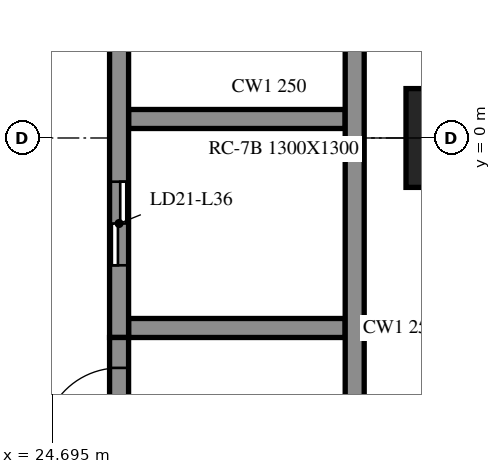
"""IFC4 building model, lengths in metres.
Left out: names, types, materials, properties, quantities, classifications, styles, units other than length and angle.
Written with IfcOpenShell. Run it as: python <this file> out.ifc"""

import sys

from ifc_helpers import new_model, si_unit, direction, frame, frame_2d, origin, origin_2d, place, context, subcontext, project, spatial, rectangle, extrude, element, fill, save


model = new_model("IFC4")
c1 = context("Model", 3, precision=1e-05, world=origin(), true_north=direction((0.0, 1.0)))
c2 = subcontext(c1, "Body", "Model", "MODEL_VIEW")
j1 = project(units=[si_unit("LENGTHUNIT", "METRE"), si_unit("PLANEANGLEUNIT", "RADIAN")], contexts=[c1])
p1 = place(None, origin())
s1 = spatial("IfcSite", under=j1, at=p1, CompositionType="ELEMENT")
p2 = place(p1, origin())
s2 = spatial("IfcBuilding", under=s1, at=p2, CompositionType="ELEMENT")
p3 = place(p2, frame((0.0, 0.0, 154.8)))
s3 = spatial("IfcBuildingStorey", under=s2, at=p3, CompositionType="ELEMENT", Elevation=154.8)
p4 = place(p3, frame((30.0, 0.0, -0.55), z_axis=(0.0, 0.0, 1.0), x_axis=(1.0, 0.0, 0.0)))
e1 = element("IfcColumn", 1, at=p4, inside=s3, PredefinedType="COLUMN", context=c2, shape_type="SweptSolid", body=[
    extrude(rectangle(XDim=1.3, YDim=1.3, at=origin_2d()), origin(), (0.0, 0.0, 1.0), 4.61),
])
p5 = place(p3, frame((28.675, -9.125, 0.0), z_axis=(0.0, 0.0, 1.0), x_axis=(0.0, 1.0, 0.0)))
e2 = element("IfcWall", 2, at=p5, inside=s3, PredefinedType="SOLIDWALL", context=c2, shape_type="SweptSolid", body=[
    extrude(rectangle(XDim=24.25, YDim=0.25, at=frame_2d((12.125, 0.0))), origin(), (0.0, 0.0, 1.0), 4.06),
])
p6 = place(p5, frame((19.062, 0.0, 0.0)))
e3 = element("IfcOpeningElement", 3, at=p6, cuts=e2, PredefinedType="OPENING", context=c2, shape_type="SweptSolid", body=[
    extrude(rectangle(XDim=0.9, YDim=2.1, at=frame_2d((0.45, 1.05))), frame((0.0, 0.135, 0.0), z_axis=(0.0, -1.0, 0.0), x_axis=(1.0, 0.0, 0.0)), (0.0, 0.0, 1.0), 0.27),
])
p7 = place(p5, frame((21.289, 0.0, 0.0)))
e4 = element("IfcOpeningElement", 4, at=p7, cuts=e2, PredefinedType="OPENING", context=c2, shape_type="SweptSolid", body=[
    extrude(rectangle(XDim=0.9, YDim=2.1, at=frame_2d((0.45, 1.05))), frame((0.0, 0.135, 0.0), z_axis=(0.0, -1.0, 0.0), x_axis=(1.0, 0.0, 0.0)), (0.0, 0.0, 1.0), 0.27),
])
p8 = place(p3, frame((25.575, -8.875, 0.0), z_axis=(0.0, 0.0, 1.0), x_axis=(0.0, 1.0, 0.0)))
e5 = element("IfcWall", 5, at=p8, inside=s3, PredefinedType="SOLIDWALL", context=c2, shape_type="SweptSolid", body=[
    extrude(rectangle(XDim=6.25, YDim=0.25, at=frame_2d((3.125, 0.0))), origin(), (0.0, 0.0, 1.0), 4.06),
])
p9 = place(p8, frame((4.85, 0.0, 0.0)))
e6 = element("IfcOpeningElement", 6, at=p9, cuts=e5, PredefinedType="OPENING", context=c2, shape_type="SweptSolid", body=[
    extrude(rectangle(XDim=1.0, YDim=2.1, at=frame_2d((0.5, 1.05))), frame((0.0, 0.135, 0.0), z_axis=(0.0, -1.0, 0.0), x_axis=(1.0, 0.0, 0.0)), (0.0, 0.0, 1.0), 0.27),
])
p10 = place(p3, frame((25.575, 14.875, 0.0), z_axis=(0.0, 0.0, 1.0), x_axis=(0.0, -1.0, 0.0)))
e7 = element("IfcWall", 7, at=p10, inside=s3, PredefinedType="SOLIDWALL", context=c2, shape_type="SweptSolid", body=[
    extrude(rectangle(XDim=17.5, YDim=0.25, at=frame_2d((8.75, 0.0))), origin(), (0.0, 0.0, 1.0), 4.06),
])
p11 = place(p10, frame((15.45, 0.0, 0.0)))
e8 = element("IfcOpeningElement", 8, at=p11, cuts=e7, PredefinedType="OPENING", context=c2, shape_type="SweptSolid", body=[
    extrude(rectangle(XDim=1.1, YDim=2.1, at=frame_2d((0.55, 1.05))), frame((0.0, 0.135, 0.0), z_axis=(0.0, -1.0, 0.0), x_axis=(1.0, 0.0, 0.0)), (0.0, 0.0, 1.0), 0.27),
])
p12 = place(p10, frame((12.8, 0.0, 0.0)))
e9 = element("IfcOpeningElement", 9, at=p12, cuts=e7, PredefinedType="OPENING", context=c2, shape_type="SweptSolid", body=[
    extrude(rectangle(XDim=0.9, YDim=2.1, at=frame_2d((0.45, 1.05))), frame((0.0, 0.135, 0.0), z_axis=(0.0, -1.0, 0.0), x_axis=(1.0, 0.0, 0.0)), (0.0, 0.0, 1.0), 0.27),
])
for number, where, z_axis, x_axis in (
    (10, (25.7, -2.5, 0.0), (0.0, 0.0, 1.0), (1.0, 0.0, 0.0)),
    (11, (25.7, 0.25, 0.0), (0.0, 0.0, 1.0), (1.0, 0.0, 0.0)),
):
    element("IfcWall", number, at=place(p3, frame(where, z_axis=z_axis, x_axis=x_axis)), inside=s3, PredefinedType="SOLIDWALL", context=c2, shape_type="SweptSolid", body=[
        extrude(rectangle(XDim=2.85, YDim=0.25, at=frame_2d((1.425, 0.0))), origin(), (0.0, 0.0, 1.0), 4.06),
    ])
p13 = place(p11, origin())
e12 = element("IfcDoor", 12, at=p13, inside=s3, OperationType="DOUBLE_DOOR_SLIDING", PredefinedType="DOOR", context=c2, shape_type="SweptSolid", body=[
    extrude(rectangle(XDim=1.1, YDim=2.1, at=frame_2d((0.55, 1.05))), frame((0.0, 0.025, 0.0), z_axis=(0.0, -1.0, 0.0), x_axis=(1.0, 0.0, 0.0)), (0.0, 0.0, 1.0), 0.05),
])
fill(e8, e12)
p14 = place(p9, origin())
e13 = element("IfcDoor", 13, at=p14, inside=s3, OperationType="SINGLE_SWING_RIGHT", PredefinedType="DOOR", context=c2, shape_type="SweptSolid", body=[
    extrude(rectangle(XDim=1.0, YDim=2.1, at=frame_2d((0.5, 1.05))), frame((0.0, 0.025, 0.0), z_axis=(0.0, -1.0, 0.0), x_axis=(1.0, 0.0, 0.0)), (0.0, 0.0, 1.0), 0.05),
])
fill(e6, e13)
save(model, sys.argv[1])
